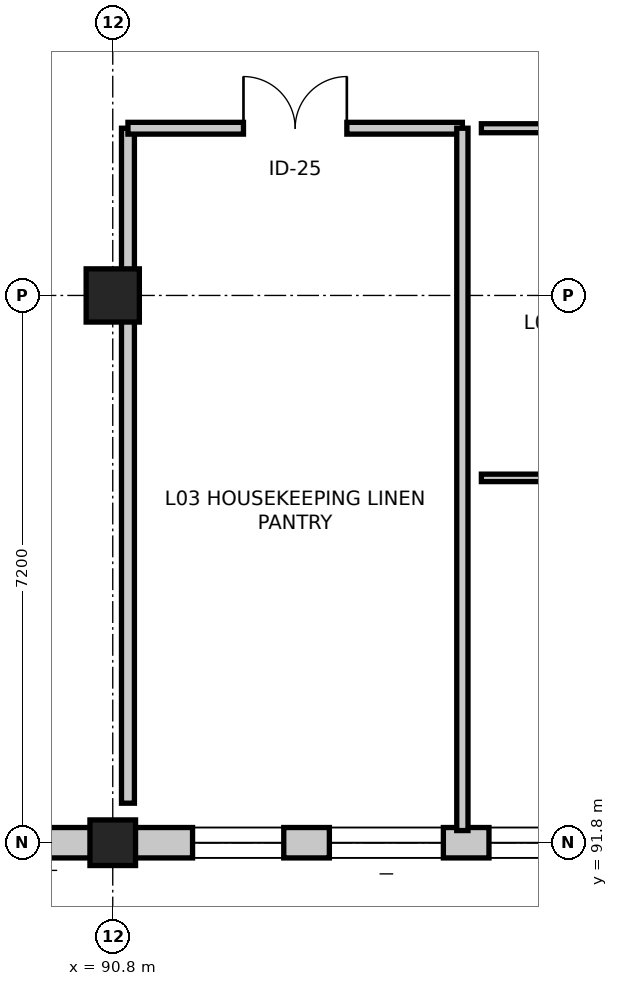
"""IFC4 building model, lengths in metres.
Left out: names, types, materials, properties, quantities, classifications, styles, units other than length and angle.
Written with IfcOpenShell. Run it as: python <this file> out.ifc"""

import sys

from ifc_helpers import new_model, si_unit, direction, frame, frame_2d, origin, origin_2d, place, context, subcontext, project, spatial, rectangle, extrude, element, fill, save


model = new_model("IFC4")
c1 = context("Model", 3, precision=1e-05, world=origin(), true_north=direction((0.0, 1.0)))
c2 = subcontext(c1, "Body", "Model", "MODEL_VIEW")
j1 = project(units=[si_unit("LENGTHUNIT", "METRE"), si_unit("PLANEANGLEUNIT", "RADIAN")], contexts=[c1])
p1 = place(None, origin())
s1 = spatial("IfcSite", under=j1, at=p1, CompositionType="ELEMENT")
p2 = place(p1, origin())
s2 = spatial("IfcBuilding", under=s1, at=p2, CompositionType="ELEMENT")
p3 = place(p2, frame((0.0, 0.0, 15.0)))
s3 = spatial("IfcBuildingStorey", under=s2, at=p3, CompositionType="ELEMENT", Elevation=15.0)
p4 = place(p3, frame((90.8, 91.8, 0.0), z_axis=(0.0, 0.0, 1.0), x_axis=(1.0, 0.0, 0.0)))
e1 = element("IfcColumn", 1, at=p4, inside=s3, PredefinedType="COLUMN", context=c2, shape_type="SweptSolid", body=[
    extrude(rectangle(XDim=0.6, YDim=0.6, at=origin_2d()), origin(), (0.0, 0.0, 1.0), 4.2),
])
p5 = place(p3, frame((90.8, 99.0, 0.0), z_axis=(0.0, 0.0, 1.0), x_axis=(1.0, 0.0, 0.0)))
e2 = element("IfcColumn", 2, at=p5, inside=s3, PredefinedType="COLUMN", context=c2, shape_type="SweptSolid", body=[
    extrude(rectangle(XDim=0.7, YDim=0.7, at=origin_2d()), origin(), (0.0, 0.0, 1.0), 4.2),
])
p6 = place(p3, frame((98.0, 91.8, 0.0), z_axis=(0.0, 0.0, 1.0), x_axis=(-1.0, 0.0, 0.0)))
e3 = element("IfcWall", 3, at=p6, inside=s3, PredefinedType="STANDARD", context=c2, shape_type="SweptSolid", body=[
    extrude(rectangle(XDim=7.2, YDim=0.4, at=frame_2d((3.6, 0.0))), origin(), (0.0, 0.0, 1.0), 3.325),
])
p7 = place(p6, frame((2.85, 0.0, 0.9)))
e4 = element("IfcOpeningElement", 4, at=p7, cuts=e3, PredefinedType="OPENING", context=c2, shape_type="SweptSolid", body=[
    extrude(rectangle(XDim=1.5, YDim=1.8, at=frame_2d((0.75, 0.9))), frame((0.0, 0.21, 0.0), z_axis=(0.0, -1.0, 0.0), x_axis=(1.0, 0.0, 0.0)), (0.0, 0.0, 1.0), 0.42),
])
p8 = place(p6, frame((1.05, 0.0, 0.85)))
e5 = element("IfcOpeningElement", 5, at=p8, cuts=e3, PredefinedType="OPENING", context=c2, shape_type="SweptSolid", body=[
    extrude(rectangle(XDim=1.2, YDim=1.8, at=frame_2d((0.6, 0.9))), frame((0.0, 0.21, 0.0), z_axis=(0.0, -1.0, 0.0), x_axis=(1.0, 0.0, 0.0)), (0.0, 0.0, 1.0), 0.42),
])
p9 = place(p6, frame((4.95, 0.0, 0.85)))
e6 = element("IfcOpeningElement", 6, at=p9, cuts=e3, PredefinedType="OPENING", context=c2, shape_type="SweptSolid", body=[
    extrude(rectangle(XDim=1.2, YDim=1.8, at=frame_2d((0.6, 0.9))), frame((0.0, 0.21, 0.0), z_axis=(0.0, -1.0, 0.0), x_axis=(1.0, 0.0, 0.0)), (0.0, 0.0, 1.0), 0.42),
])
p10 = place(p3, frame((90.8, 91.8, 0.0), z_axis=(0.0, 0.0, 1.0), x_axis=(-1.0, 0.0, 0.0)))
e7 = element("IfcWall", 7, at=p10, inside=s3, PredefinedType="STANDARD", context=c2, shape_type="SweptSolid", body=[
    extrude(rectangle(XDim=7.2, YDim=0.4, at=frame_2d((3.6, 0.0))), origin(), (0.0, 0.0, 1.0), 3.325),
])
p11 = place(p10, frame((2.775, 0.0, 0.9)))
e8 = element("IfcOpeningElement", 8, at=p11, cuts=e7, PredefinedType="OPENING", context=c2, shape_type="SweptSolid", body=[
    extrude(rectangle(XDim=1.65, YDim=1.8, at=frame_2d((0.825, 0.9))), frame((0.0, 0.21, 0.0), z_axis=(0.0, -1.0, 0.0), x_axis=(1.0, 0.0, 0.0)), (0.0, 0.0, 1.0), 0.42),
])
p12 = place(p10, frame((4.95, 0.0, 0.85)))
e9 = element("IfcOpeningElement", 9, at=p12, cuts=e7, PredefinedType="OPENING", context=c2, shape_type="SweptSolid", body=[
    extrude(rectangle(XDim=1.2, YDim=1.8, at=frame_2d((0.6, 0.9))), frame((0.0, 0.21, 0.0), z_axis=(0.0, -1.0, 0.0), x_axis=(1.0, 0.0, 0.0)), (0.0, 0.0, 1.0), 0.42),
])
p13 = place(p3, frame((91.0, 92.32, 0.0), z_axis=(0.0, 0.0, 1.0), x_axis=(0.0, 1.0, 0.0)))
e10 = element("IfcWall", 10, at=p13, inside=s3, PredefinedType="PARTITIONING", context=c2, shape_type="SweptSolid", body=[
    extrude(rectangle(XDim=8.88, YDim=0.17, at=frame_2d((4.44, 0.0))), origin(), (0.0, 0.0, 1.0), 3.275),
])
p14 = place(p3, frame((91.0, 101.2, 0.0), z_axis=(0.0, 0.0, 1.0), x_axis=(1.0, 0.0, 0.0)))
e11 = element("IfcWall", 11, at=p14, inside=s3, PredefinedType="PARTITIONING", context=c2, shape_type="SweptSolid", body=[
    extrude(rectangle(XDim=4.4, YDim=0.155, at=frame_2d((2.2, 0.0))), origin(), (0.0, 0.0, 1.0), 3.275),
])
p15 = place(p14, frame((1.52, 0.0, 0.0)))
e12 = element("IfcOpeningElement", 12, at=p15, cuts=e11, PredefinedType="OPENING", context=c2, shape_type="SweptSolid", body=[
    extrude(rectangle(XDim=1.36, YDim=2.22, at=frame_2d((0.68, 1.11))), frame((0.0, 0.087, 0.0), z_axis=(0.0, -1.0, 0.0), x_axis=(1.0, 0.0, 0.0)), (0.0, 0.0, 1.0), 0.175),
])
p16 = place(p3, frame((95.4, 101.2, 0.0), z_axis=(0.0, 0.0, 1.0), x_axis=(0.0, -1.0, 0.0)))
e13 = element("IfcWall", 13, at=p16, inside=s3, PredefinedType="PARTITIONING", context=c2, shape_type="SweptSolid", body=[
    extrude(rectangle(XDim=9.24, YDim=0.148, at=frame_2d((4.62, 0.0))), origin(), (0.0, 0.0, 1.0), 3.325),
])
p17 = place(p3, frame((95.65, 101.2, 0.0), z_axis=(0.0, 0.0, 1.0), x_axis=(1.0, 0.0, 0.0)))
e14 = element("IfcWall", 14, at=p17, inside=s3, PredefinedType="PARTITIONING", context=c2, shape_type="SweptSolid", body=[
    extrude(rectangle(XDim=3.25, YDim=0.118, at=frame_2d((1.625, 0.0))), origin(), (0.0, 0.0, 1.0), 3.275),
])
p18 = place(p17, frame((0.845, 0.0, 0.0)))
e15 = element("IfcOpeningElement", 15, at=p18, cuts=e14, PredefinedType="OPENING", context=c2, shape_type="SweptSolid", body=[
    extrude(rectangle(XDim=1.56, YDim=2.26, at=frame_2d((0.78, 1.13))), frame((0.0, 0.069, 0.0), z_axis=(0.0, -1.0, 0.0), x_axis=(1.0, 0.0, 0.0)), (0.0, 0.0, 1.0), 0.138),
])
p19 = place(p3, frame((98.9, 96.6, 0.0), z_axis=(0.0, 0.0, 1.0), x_axis=(-1.0, 0.0, 0.0)))
e16 = element("IfcWall", 16, at=p19, inside=s3, PredefinedType="PARTITIONING", context=c2, shape_type="SweptSolid", body=[
    extrude(rectangle(XDim=3.25, YDim=0.098, at=frame_2d((1.625, 0.0))), origin(), (0.0, 0.0, 1.0), 3.275),
])
p20 = place(p7, origin())
e17 = element("IfcWindow", 17, at=p20, inside=s3, PartitioningType="SINGLE_PANEL", PredefinedType="WINDOW", context=c2, shape_type="SweptSolid", body=[
    extrude(rectangle(XDim=1.5, YDim=1.8, at=frame_2d((0.75, 0.9))), frame((0.0, 0.03, 0.0), z_axis=(0.0, -1.0, 0.0), x_axis=(1.0, 0.0, 0.0)), (0.0, 0.0, 1.0), 0.06),
])
fill(e4, e17)
p21 = place(p8, origin())
e18 = element("IfcWindow", 18, at=p21, inside=s3, PartitioningType="SINGLE_PANEL", PredefinedType="WINDOW", context=c2, shape_type="SweptSolid", body=[
    extrude(rectangle(XDim=1.2, YDim=1.8, at=frame_2d((0.6, 0.9))), frame((0.0, 0.03, 0.0), z_axis=(0.0, -1.0, 0.0), x_axis=(1.0, 0.0, 0.0)), (0.0, 0.0, 1.0), 0.06),
])
fill(e5, e18)
p22 = place(p9, origin())
e19 = element("IfcWindow", 19, at=p22, inside=s3, PartitioningType="SINGLE_PANEL", PredefinedType="WINDOW", context=c2, shape_type="SweptSolid", body=[
    extrude(rectangle(XDim=1.2, YDim=1.8, at=frame_2d((0.6, 0.9))), frame((0.0, 0.03, 0.0), z_axis=(0.0, -1.0, 0.0), x_axis=(1.0, 0.0, 0.0)), (0.0, 0.0, 1.0), 0.06),
])
fill(e6, e19)
p23 = place(p15, origin())
e20 = element("IfcDoor", 20, at=p23, inside=s3, OperationType="DOUBLE_DOOR_SINGLE_SWING", PredefinedType="DOOR", context=c2, shape_type="SweptSolid", body=[
    extrude(rectangle(XDim=1.36, YDim=2.22, at=frame_2d((0.68, 1.11))), frame((0.0, 0.025, 0.0), z_axis=(0.0, -1.0, 0.0), x_axis=(1.0, 0.0, 0.0)), (0.0, 0.0, 1.0), 0.05),
])
fill(e12, e20)
save(model, sys.argv[1])
